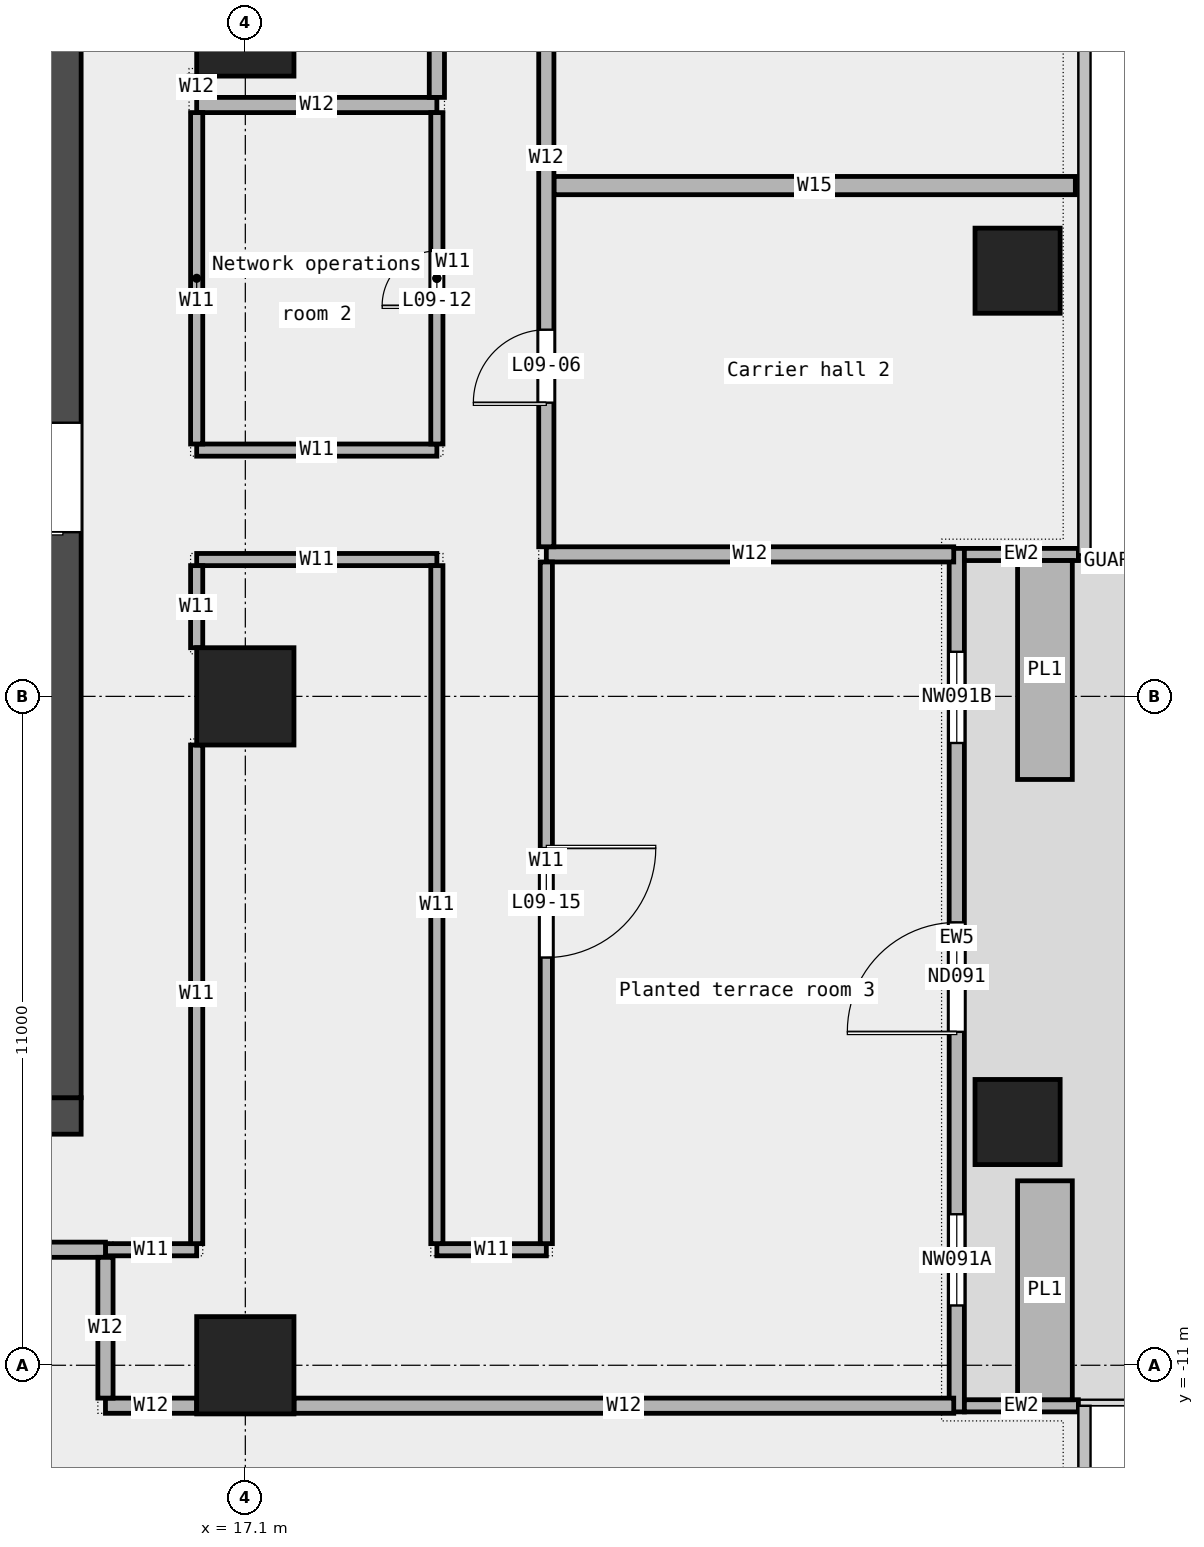
"""IFC4 building model, lengths in metres.
Left out: names, types, materials, properties, quantities, classifications, styles, units other than length and angle.
Written with IfcOpenShell. Run it as: python <this file> out.ifc"""

import sys

from ifc_helpers import new_model, si_unit, direction, frame, frame_2d, origin, origin_2d, place, context, subcontext, project, spatial, rectangle, extrude, element, fill, save


model = new_model("IFC4")
c1 = context("Model", 3, precision=1e-05, world=origin(), true_north=direction((0.0, 1.0)))
c2 = subcontext(c1, "Body", "Model", "MODEL_VIEW")
j1 = project(units=[si_unit("LENGTHUNIT", "METRE"), si_unit("PLANEANGLEUNIT", "RADIAN")], contexts=[c1])
p1 = place(None, origin())
s1 = spatial("IfcSite", under=j1, at=p1, CompositionType="ELEMENT")
p2 = place(p1, origin())
s2 = spatial("IfcBuilding", under=s1, at=p2, CompositionType="ELEMENT")
p3 = place(p2, frame((0.0, 0.0, 50.2)))
s3 = spatial("IfcBuildingStorey", under=s2, at=p3, CompositionType="ELEMENT", Elevation=50.2)
for number, where, z_axis, x_axis in (
    (1, (29.8, -7.0, 0.0), (0.0, 0.0, 1.0), (1.0, 0.0, 0.0)),
    (2, (29.8, 7.0, 0.0), (0.0, 0.0, 1.0), (1.0, 0.0, 0.0)),
):
    element("IfcColumn", number, at=place(p3, frame(where, z_axis=z_axis, x_axis=x_axis)), inside=s3, PredefinedType="COLUMN", context=c2, shape_type="SweptSolid", body=[
        extrude(rectangle(XDim=1.4, YDim=1.4, at=origin_2d()), origin(), (0.0, 0.0, 1.0), 4.35),
    ])
for number, where, z_axis, x_axis in (
    (3, (17.1, -11.0, 0.0), (0.0, 0.0, 1.0), (1.0, 0.0, 0.0)),
    (4, (17.1, 0.0, 0.0), (0.0, 0.0, 1.0), (1.0, 0.0, 0.0)),
    (5, (17.1, 11.0, 0.0), (0.0, 0.0, 1.0), (1.0, 0.0, 0.0)),
):
    element("IfcColumn", number, at=place(p3, frame(where, z_axis=z_axis, x_axis=x_axis)), inside=s3, PredefinedType="COLUMN", context=c2, shape_type="SweptSolid", body=[
        extrude(rectangle(XDim=1.6, YDim=1.6, at=origin_2d()), origin(), (0.0, 0.0, 1.0), 4.35),
    ])
p4 = place(p3, frame((28.8, -11.767, 0.0), z_axis=(0.0, 0.0, 1.0), x_axis=(0.0, 1.0, 0.0)))
e6 = element("IfcWall", 6, at=p4, inside=s3, PredefinedType="STANDARD", context=c2, shape_type="SweptSolid", body=[
    extrude(rectangle(XDim=14.2, YDim=0.25, at=frame_2d((7.1, 0.0))), origin(), (0.0, 0.0, 1.0), 4.35),
])
p5 = place(p4, frame((1.75, 0.0, 0.45)))
e7 = element("IfcOpeningElement", 7, at=p5, cuts=e6, PredefinedType="OPENING", context=c2, shape_type="SweptSolid", body=[
    extrude(rectangle(XDim=1.5, YDim=3.0, at=frame_2d((0.75, 1.5))), frame((0.0, 0.137, 0.0), z_axis=(0.0, -1.0, 0.0), x_axis=(1.0, 0.0, 0.0)), (0.0, 0.0, 1.0), 0.274),
])
p6 = place(p4, frame((6.25, 0.0, 0.0)))
e8 = element("IfcOpeningElement", 8, at=p6, cuts=e6, PredefinedType="OPENING", context=c2, shape_type="SweptSolid", body=[
    extrude(rectangle(XDim=1.8, YDim=2.4, at=frame_2d((0.9, 1.2))), frame((0.0, 0.137, 0.0), z_axis=(0.0, -1.0, 0.0), x_axis=(1.0, 0.0, 0.0)), (0.0, 0.0, 1.0), 0.274),
])
p7 = place(p4, frame((11.0, 0.0, 0.45)))
e9 = element("IfcOpeningElement", 9, at=p7, cuts=e6, PredefinedType="OPENING", context=c2, shape_type="SweptSolid", body=[
    extrude(rectangle(XDim=1.5, YDim=3.0, at=frame_2d((0.75, 1.5))), frame((0.0, 0.137, 0.0), z_axis=(0.0, -1.0, 0.0), x_axis=(1.0, 0.0, 0.0)), (0.0, 0.0, 1.0), 0.274),
])
for number, where, z_axis, x_axis in (
    (10, (30.8, -11.667, 0.0), (0.0, 0.0, 1.0), (-1.0, 0.0, 0.0)),
    (11, (30.8, 2.333, 0.0), (0.0, 0.0, 1.0), (-1.0, 0.0, 0.0)),
):
    element("IfcWall", number, at=place(p3, frame(where, z_axis=z_axis, x_axis=x_axis)), inside=s3, PredefinedType="STANDARD", context=c2, shape_type="SweptSolid", body=[
        extrude(rectangle(XDim=1.875, YDim=0.2, at=frame_2d((0.938, 0.0))), origin(), (0.0, 0.0, 1.0), 4.35),
    ])
for number, where, z_axis, x_axis in (
    (12, (30.25, -11.567, 0.0), (0.0, 0.0, 1.0), (0.0, 1.0, 0.0)),
    (13, (30.25, -1.367, 0.0), (0.0, 0.0, 1.0), (0.0, 1.0, 0.0)),
):
    element("IfcWall", number, at=place(p3, frame(where, z_axis=z_axis, x_axis=x_axis)), inside=s3, PredefinedType="STANDARD", context=c2, shape_type="SweptSolid", body=[
        extrude(rectangle(XDim=3.6, YDim=0.9, at=frame_2d((1.8, 0.0))), origin(), (0.0, 0.0, 1.0), 0.7),
    ])
p8 = place(p3, frame((14.8, -11.665, 0.0), z_axis=(0.0, 0.0, 1.0), x_axis=(1.0, 0.0, 0.0)))
e14 = element("IfcWall", 14, at=p8, inside=s3, PredefinedType="PARTITIONING", context=c2, shape_type="SweptSolid", body=[
    extrude(rectangle(XDim=1.5, YDim=0.25, at=frame_2d((0.75, 0.0))), origin(), (0.0, 0.0, 1.0), 4.35),
])
p9 = place(p3, frame((17.9, -11.665, 0.0), z_axis=(0.0, 0.0, 1.0), x_axis=(1.0, 0.0, 0.0)))
e15 = element("IfcWall", 15, at=p9, inside=s3, PredefinedType="PARTITIONING", context=c2, shape_type="SweptSolid", body=[
    extrude(rectangle(XDim=10.85, YDim=0.25, at=frame_2d((5.425, 0.0))), origin(), (0.0, 0.0, 1.0), 4.35),
])
p10 = place(p3, frame((14.8, -9.1, 0.0), z_axis=(0.0, 0.0, 1.0), x_axis=(1.0, 0.0, 0.0)))
e16 = element("IfcWall", 16, at=p10, inside=s3, PredefinedType="PARTITIONING", context=c2, shape_type="SweptSolid", body=[
    extrude(rectangle(XDim=1.5, YDim=0.2, at=frame_2d((0.75, 0.0))), origin(), (0.0, 0.0, 1.0), 4.35),
])
p11 = place(p3, frame((20.25, -9.1, 0.0), z_axis=(0.0, 0.0, 1.0), x_axis=(1.0, 0.0, 0.0)))
e17 = element("IfcWall", 17, at=p11, inside=s3, PredefinedType="PARTITIONING", context=c2, shape_type="SweptSolid", body=[
    extrude(rectangle(XDim=1.8, YDim=0.2, at=frame_2d((0.9, 0.0))), origin(), (0.0, 0.0, 1.0), 4.35),
])
p12 = place(p3, frame((-14.8, -9.1, 0.0), z_axis=(0.0, 0.0, 1.0), x_axis=(1.0, 0.0, 0.0)))
e18 = element("IfcWall", 18, at=p12, inside=s3, PredefinedType="PARTITIONING", context=c2, shape_type="SweptSolid", body=[
    extrude(rectangle(XDim=29.6, YDim=0.25, at=frame_2d((14.8, 0.0))), origin(), (0.0, 0.0, 1.0), 4.35),
])
p13 = place(p12, frame((4.802, 0.0, 0.0)))
e19 = element("IfcOpeningElement", 19, at=p13, cuts=e18, PredefinedType="OPENING", context=c2, shape_type="SweptSolid", body=[
    extrude(rectangle(XDim=1.8, YDim=2.1, at=frame_2d((0.9, 1.05))), frame((0.0, 0.137, 0.0), z_axis=(0.0, -1.0, 0.0), x_axis=(1.0, 0.0, 0.0)), (0.0, 0.0, 1.0), 0.274),
])
p14 = place(p12, frame((21.403, 0.0, 0.0)))
e20 = element("IfcOpeningElement", 20, at=p14, cuts=e18, PredefinedType="OPENING", context=c2, shape_type="SweptSolid", body=[
    extrude(rectangle(XDim=1.8, YDim=2.1, at=frame_2d((0.9, 1.05))), frame((0.0, 0.137, 0.0), z_axis=(0.0, -1.0, 0.0), x_axis=(1.0, 0.0, 0.0)), (0.0, 0.0, 1.0), 0.274),
])
p15 = place(p3, frame((16.3, 2.25, 0.0), z_axis=(0.0, 0.0, 1.0), x_axis=(1.0, 0.0, 0.0)))
e21 = element("IfcWall", 21, at=p15, inside=s3, PredefinedType="PARTITIONING", context=c2, shape_type="SweptSolid", body=[
    extrude(rectangle(XDim=3.95, YDim=0.2, at=frame_2d((1.975, 0.0))), origin(), (0.0, 0.0, 1.0), 4.35),
])
p16 = place(p3, frame((22.05, 2.335, 0.0), z_axis=(0.0, 0.0, 1.0), x_axis=(1.0, 0.0, 0.0)))
e22 = element("IfcWall", 22, at=p16, inside=s3, PredefinedType="PARTITIONING", context=c2, shape_type="SweptSolid", body=[
    extrude(rectangle(XDim=6.7, YDim=0.25, at=frame_2d((3.35, 0.0))), origin(), (0.0, 0.0, 1.0), 4.35),
])
p17 = place(p3, frame((16.3, 4.05, 0.0), z_axis=(0.0, 0.0, 1.0), x_axis=(1.0, 0.0, 0.0)))
e23 = element("IfcWall", 23, at=p17, inside=s3, PredefinedType="PARTITIONING", context=c2, shape_type="SweptSolid", body=[
    extrude(rectangle(XDim=3.95, YDim=0.2, at=frame_2d((1.975, 0.0))), origin(), (0.0, 0.0, 1.0), 4.35),
])
p18 = place(p3, frame((22.175, 8.4, 0.0), z_axis=(0.0, 0.0, 1.0), x_axis=(1.0, 0.0, 0.0)))
e24 = element("IfcWall", 24, at=p18, inside=s3, PredefinedType="PARTITIONING", context=c2, shape_type="SweptSolid", body=[
    extrude(rectangle(XDim=8.575, YDim=0.3, at=frame_2d((4.288, 0.0))), origin(), (0.0, 0.0, 1.0), 4.35),
])
p19 = place(p3, frame((16.3, 9.725, 0.0), z_axis=(0.0, 0.0, 1.0), x_axis=(1.0, 0.0, 0.0)))
e25 = element("IfcWall", 25, at=p19, inside=s3, PredefinedType="PARTITIONING", context=c2, shape_type="SweptSolid", body=[
    extrude(rectangle(XDim=3.95, YDim=0.25, at=frame_2d((1.975, 0.0))), origin(), (0.0, 0.0, 1.0), 4.35),
])
p20 = place(p3, frame((14.8, -11.54, 0.0), z_axis=(0.0, 0.0, 1.0), x_axis=(0.0, 1.0, 0.0)))
e26 = element("IfcWall", 26, at=p20, inside=s3, PredefinedType="PARTITIONING", context=c2, shape_type="SweptSolid", body=[
    extrude(rectangle(XDim=2.315, YDim=0.25, at=frame_2d((1.157, 0.0))), origin(), (0.0, 0.0, 1.0), 4.35),
])
p21 = place(p3, frame((16.3, -9.0, 0.0), z_axis=(0.0, 0.0, 1.0), x_axis=(0.0, 1.0, 0.0)))
e27 = element("IfcWall", 27, at=p21, inside=s3, PredefinedType="PARTITIONING", context=c2, shape_type="SweptSolid", body=[
    extrude(rectangle(XDim=8.2, YDim=0.2, at=frame_2d((4.1, 0.0))), origin(), (0.0, 0.0, 1.0), 4.35),
])
p22 = place(p3, frame((16.3, 0.8, 0.0), z_axis=(0.0, 0.0, 1.0), x_axis=(0.0, 1.0, 0.0)))
e28 = element("IfcWall", 28, at=p22, inside=s3, PredefinedType="PARTITIONING", context=c2, shape_type="SweptSolid", body=[
    extrude(rectangle(XDim=1.35, YDim=0.2, at=frame_2d((0.675, 0.0))), origin(), (0.0, 0.0, 1.0), 4.35),
])
p23 = place(p3, frame((16.3, 4.15, 0.0), z_axis=(0.0, 0.0, 1.0), x_axis=(0.0, 1.0, 0.0)))
e29 = element("IfcWall", 29, at=p23, inside=s3, PredefinedType="PARTITIONING", context=c2, shape_type="SweptSolid", body=[
    extrude(rectangle(XDim=5.45, YDim=0.2, at=frame_2d((2.725, 0.0))), origin(), (0.0, 0.0, 1.0), 4.35),
])
p24 = place(p3, frame((16.3, 9.85, 0.0), z_axis=(0.0, 0.0, 1.0), x_axis=(0.0, 1.0, 0.0)))
e30 = element("IfcWall", 30, at=p24, inside=s3, PredefinedType="PARTITIONING", context=c2, shape_type="SweptSolid", body=[
    extrude(rectangle(XDim=0.35, YDim=0.25, at=frame_2d((0.175, 0.0))), origin(), (0.0, 0.0, 1.0), 4.35),
])
p25 = place(p3, frame((20.25, -9.0, 0.0), z_axis=(0.0, 0.0, 1.0), x_axis=(0.0, 1.0, 0.0)))
e31 = element("IfcWall", 31, at=p25, inside=s3, PredefinedType="PARTITIONING", context=c2, shape_type="SweptSolid", body=[
    extrude(rectangle(XDim=11.15, YDim=0.2, at=frame_2d((5.575, 0.0))), origin(), (0.0, 0.0, 1.0), 4.35),
])
p26 = place(p3, frame((20.25, 4.15, 0.0), z_axis=(0.0, 0.0, 1.0), x_axis=(0.0, 1.0, 0.0)))
e32 = element("IfcWall", 32, at=p26, inside=s3, PredefinedType="PARTITIONING", context=c2, shape_type="SweptSolid", body=[
    extrude(rectangle(XDim=5.45, YDim=0.2, at=frame_2d((2.725, 0.0))), origin(), (0.0, 0.0, 1.0), 4.35),
])
p27 = place(p26, frame((2.275, 0.0, 0.0)))
e33 = element("IfcOpeningElement", 33, at=p27, cuts=e32, PredefinedType="OPENING", context=c2, shape_type="SweptSolid", body=[
    extrude(rectangle(XDim=0.9, YDim=2.1, at=frame_2d((0.45, 1.05))), frame((0.0, 0.112, 0.0), z_axis=(0.0, -1.0, 0.0), x_axis=(1.0, 0.0, 0.0)), (0.0, 0.0, 1.0), 0.224),
])
p28 = place(p3, frame((20.25, 9.85, 0.0), z_axis=(0.0, 0.0, 1.0), x_axis=(0.0, 1.0, 0.0)))
e34 = element("IfcWall", 34, at=p28, inside=s3, PredefinedType="PARTITIONING", context=c2, shape_type="SweptSolid", body=[
    extrude(rectangle(XDim=5.4, YDim=0.25, at=frame_2d((2.7, 0.0))), origin(), (0.0, 0.0, 1.0), 4.35),
])
p29 = place(p28, frame((2.25, 0.0, 0.0)))
e35 = element("IfcOpeningElement", 35, at=p29, cuts=e34, PredefinedType="OPENING", context=c2, shape_type="SweptSolid", body=[
    extrude(rectangle(XDim=0.9, YDim=2.1, at=frame_2d((0.45, 1.05))), frame((0.0, 0.137, 0.0), z_axis=(0.0, -1.0, 0.0), x_axis=(1.0, 0.0, 0.0)), (0.0, 0.0, 1.0), 0.274),
])
p30 = place(p3, frame((22.05, -9.0, 0.0), z_axis=(0.0, 0.0, 1.0), x_axis=(0.0, 1.0, 0.0)))
e36 = element("IfcWall", 36, at=p30, inside=s3, PredefinedType="PARTITIONING", context=c2, shape_type="SweptSolid", body=[
    extrude(rectangle(XDim=11.21, YDim=0.2, at=frame_2d((5.605, 0.0))), origin(), (0.0, 0.0, 1.0), 4.35),
])
p31 = place(p30, frame((4.705, 0.0, 0.0)))
e37 = element("IfcOpeningElement", 37, at=p31, cuts=e36, PredefinedType="OPENING", context=c2, shape_type="SweptSolid", body=[
    extrude(rectangle(XDim=1.8, YDim=2.1, at=frame_2d((0.9, 1.05))), frame((0.0, 0.112, 0.0), z_axis=(0.0, -1.0, 0.0), x_axis=(1.0, 0.0, 0.0)), (0.0, 0.0, 1.0), 0.224),
])
p32 = place(p3, frame((22.05, 2.46, 0.0), z_axis=(0.0, 0.0, 1.0), x_axis=(0.0, 1.0, 0.0)))
e38 = element("IfcWall", 38, at=p32, inside=s3, PredefinedType="PARTITIONING", context=c2, shape_type="SweptSolid", body=[
    extrude(rectangle(XDim=12.79, YDim=0.25, at=frame_2d((6.395, 0.0))), origin(), (0.0, 0.0, 1.0), 4.35),
])
p33 = place(p32, frame((2.37, 0.0, 0.0)))
e39 = element("IfcOpeningElement", 39, at=p33, cuts=e38, PredefinedType="OPENING", context=c2, shape_type="SweptSolid", body=[
    extrude(rectangle(XDim=1.2, YDim=2.1, at=frame_2d((0.6, 1.05))), frame((0.0, 0.137, 0.0), z_axis=(0.0, -1.0, 0.0), x_axis=(1.0, 0.0, 0.0)), (0.0, 0.0, 1.0), 0.274),
])
p34 = place(p32, frame((8.765, 0.0, 0.0)))
e40 = element("IfcOpeningElement", 40, at=p34, cuts=e38, PredefinedType="OPENING", context=c2, shape_type="SweptSolid", body=[
    extrude(rectangle(XDim=1.2, YDim=2.1, at=frame_2d((0.6, 1.05))), frame((0.0, 0.137, 0.0), z_axis=(0.0, -1.0, 0.0), x_axis=(1.0, 0.0, 0.0)), (0.0, 0.0, 1.0), 0.274),
])
p35 = place(p3, frame((-14.4, -6.9, 0.0), z_axis=(0.0, 0.0, 1.0), x_axis=(1.0, 0.0, 0.0)))
e41 = element("IfcWall", 41, at=p35, inside=s3, PredefinedType="SHEAR", context=c2, shape_type="SweptSolid", body=[
    extrude(rectangle(XDim=28.8, YDim=0.6, at=frame_2d((14.4, 0.0))), origin(), (0.0, 0.0, 1.0), 4.5),
])
p36 = place(p35, frame((4.9, 0.0, 0.0)))
e42 = element("IfcOpeningElement", 42, at=p36, cuts=e41, PredefinedType="OPENING", context=c2, shape_type="SweptSolid", body=[
    extrude(rectangle(XDim=1.0, YDim=2.1, at=frame_2d((0.5, 1.05))), frame((0.0, 0.312, 0.0), z_axis=(0.0, -1.0, 0.0), x_axis=(1.0, 0.0, 0.0)), (0.0, 0.0, 1.0), 0.624),
])
p37 = place(p35, frame((8.462, 0.0, 0.0)))
e43 = element("IfcOpeningElement", 43, at=p37, cuts=e41, PredefinedType="OPENING", context=c2, shape_type="SweptSolid", body=[
    extrude(rectangle(XDim=1.0, YDim=2.1, at=frame_2d((0.5, 1.05))), frame((0.0, 0.312, 0.0), z_axis=(0.0, -1.0, 0.0), x_axis=(1.0, 0.0, 0.0)), (0.0, 0.0, 1.0), 0.624),
])
p38 = place(p35, frame((13.425, 0.0, 0.0)))
e44 = element("IfcOpeningElement", 44, at=p38, cuts=e41, PredefinedType="OPENING", context=c2, shape_type="SweptSolid", body=[
    extrude(rectangle(XDim=1.2, YDim=2.1, at=frame_2d((0.6, 1.05))), frame((0.0, 0.312, 0.0), z_axis=(0.0, -1.0, 0.0), x_axis=(1.0, 0.0, 0.0)), (0.0, 0.0, 1.0), 0.624),
])
p39 = place(p35, frame((18.75, 0.0, 0.0)))
e45 = element("IfcOpeningElement", 45, at=p39, cuts=e41, PredefinedType="OPENING", context=c2, shape_type="SweptSolid", body=[
    extrude(rectangle(XDim=1.8, YDim=2.1, at=frame_2d((0.9, 1.05))), frame((0.0, 0.312, 0.0), z_axis=(0.0, -1.0, 0.0), x_axis=(1.0, 0.0, 0.0)), (0.0, 0.0, 1.0), 0.624),
])
p40 = place(p35, frame((23.087, 0.0, 0.0)))
e46 = element("IfcOpeningElement", 46, at=p40, cuts=e41, PredefinedType="OPENING", context=c2, shape_type="SweptSolid", body=[
    extrude(rectangle(XDim=1.0, YDim=2.1, at=frame_2d((0.5, 1.05))), frame((0.0, 0.312, 0.0), z_axis=(0.0, -1.0, 0.0), x_axis=(1.0, 0.0, 0.0)), (0.0, 0.0, 1.0), 0.624),
])
p41 = place(p3, frame((14.1, -6.6, 0.0), z_axis=(0.0, 0.0, 1.0), x_axis=(0.0, 1.0, 0.0)))
e47 = element("IfcWall", 47, at=p41, inside=s3, PredefinedType="SHEAR", context=c2, shape_type="SweptSolid", body=[
    extrude(rectangle(XDim=19.5, YDim=0.6, at=frame_2d((9.75, 0.0))), origin(), (0.0, 0.0, 1.0), 4.5),
])
p42 = place(p41, frame((9.3, 0.0, 0.0)))
e48 = element("IfcOpeningElement", 48, at=p42, cuts=e47, PredefinedType="OPENING", context=c2, shape_type="SweptSolid", body=[
    extrude(rectangle(XDim=1.8, YDim=2.1, at=frame_2d((0.9, 1.05))), frame((0.0, 0.312, 0.0), z_axis=(0.0, -1.0, 0.0), x_axis=(1.0, 0.0, 0.0)), (0.0, 0.0, 1.0), 0.624),
])
p43 = place(p5, origin())
e49 = element("IfcWindow", 49, at=p43, inside=s3, PartitioningType="SINGLE_PANEL", PredefinedType="WINDOW", context=c2, shape_type="SweptSolid", body=[
    extrude(rectangle(XDim=1.5, YDim=3.0, at=frame_2d((0.75, 1.5))), frame((0.0, 0.03, 0.0), z_axis=(0.0, -1.0, 0.0), x_axis=(1.0, 0.0, 0.0)), (0.0, 0.0, 1.0), 0.06),
])
fill(e7, e49)
p44 = place(p6, origin())
e50 = element("IfcDoor", 50, at=p44, inside=s3, OperationType="DOUBLE_DOOR_SINGLE_SWING", PredefinedType="DOOR", context=c2, shape_type="SweptSolid", body=[
    extrude(rectangle(XDim=1.8, YDim=2.4, at=frame_2d((0.9, 1.2))), frame((0.0, 0.025, 0.0), z_axis=(0.0, -1.0, 0.0), x_axis=(1.0, 0.0, 0.0)), (0.0, 0.0, 1.0), 0.05),
])
fill(e8, e50)
p45 = place(p7, origin())
e51 = element("IfcWindow", 51, at=p45, inside=s3, PartitioningType="SINGLE_PANEL", PredefinedType="WINDOW", context=c2, shape_type="SweptSolid", body=[
    extrude(rectangle(XDim=1.5, YDim=3.0, at=frame_2d((0.75, 1.5))), frame((0.0, 0.03, 0.0), z_axis=(0.0, -1.0, 0.0), x_axis=(1.0, 0.0, 0.0)), (0.0, 0.0, 1.0), 0.06),
])
fill(e9, e51)
p46 = place(p33, origin())
e52 = element("IfcDoor", 52, at=p46, inside=s3, OperationType="SINGLE_SWING_LEFT", PredefinedType="DOOR", context=c2, shape_type="SweptSolid", body=[
    extrude(rectangle(XDim=1.2, YDim=2.1, at=frame_2d((0.6, 1.05))), frame((0.0, 0.025, 0.0), z_axis=(0.0, -1.0, 0.0), x_axis=(1.0, 0.0, 0.0)), (0.0, 0.0, 1.0), 0.05),
])
fill(e39, e52)
p47 = place(p27, origin())
e53 = element("IfcDoor", 53, at=p47, inside=s3, OperationType="SINGLE_SWING_LEFT", PredefinedType="DOOR", context=c2, shape_type="SweptSolid", body=[
    extrude(rectangle(XDim=0.9, YDim=2.1, at=frame_2d((0.45, 1.05))), frame((0.0, 0.025, 0.0), z_axis=(0.0, -1.0, 0.0), x_axis=(1.0, 0.0, 0.0)), (0.0, 0.0, 1.0), 0.05),
])
fill(e33, e53)
p48 = place(p31, origin())
e54 = element("IfcDoor", 54, at=p48, inside=s3, OperationType="DOUBLE_DOOR_SINGLE_SWING", PredefinedType="DOOR", context=c2, shape_type="SweptSolid", body=[
    extrude(rectangle(XDim=1.8, YDim=2.1, at=frame_2d((0.9, 1.05))), frame((0.0, 0.025, 0.0), z_axis=(0.0, -1.0, 0.0), x_axis=(1.0, 0.0, 0.0)), (0.0, 0.0, 1.0), 0.05),
])
fill(e37, e54)
p49 = place(p42, origin())
e55 = element("IfcDoor", 55, at=p49, inside=s3, OperationType="DOUBLE_DOOR_SINGLE_SWING", PredefinedType="DOOR", context=c2, shape_type="SweptSolid", body=[
    extrude(rectangle(XDim=1.8, YDim=2.1, at=frame_2d((0.9, 1.05))), frame((0.0, 0.025, 0.0), z_axis=(0.0, -1.0, 0.0), x_axis=(1.0, 0.0, 0.0)), (0.0, 0.0, 1.0), 0.05),
])
fill(e48, e55)
save(model, sys.argv[1])
